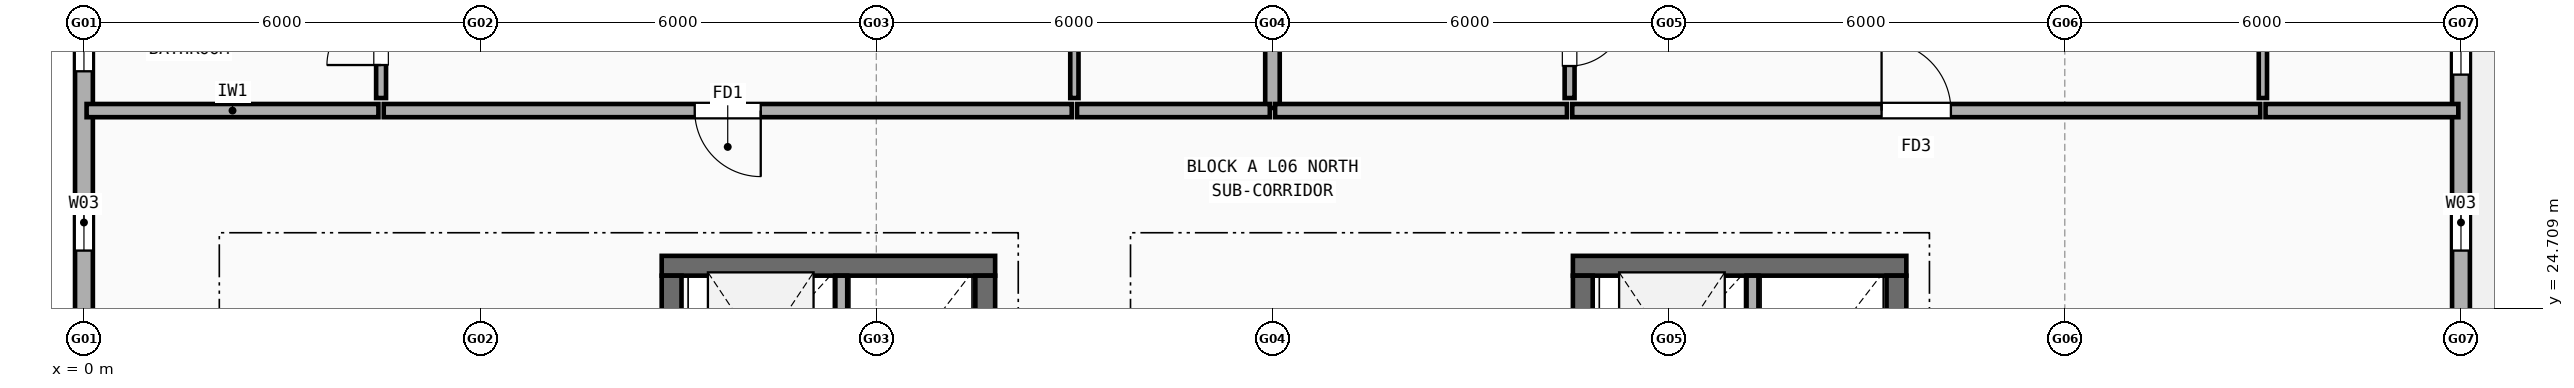
"""IFC4 building model, lengths in metres.
Left out: names, types, materials, properties, quantities, classifications, styles, units other than length and angle.
Written with IfcOpenShell. Run it as: python <this file> out.ifc"""

import sys

from ifc_helpers import new_model, si_unit, direction, frame, frame_2d, origin, place, context, subcontext, project, spatial, rectangle, extrude, element, fill, save


model = new_model("IFC4")
c1 = context("Model", 3, precision=1e-05, world=origin(), true_north=direction((0.0, 1.0)))
c2 = subcontext(c1, "Body", "Model", "MODEL_VIEW")
j1 = project(units=[si_unit("LENGTHUNIT", "METRE"), si_unit("PLANEANGLEUNIT", "RADIAN")], contexts=[c1])
p1 = place(None, origin())
s1 = spatial("IfcSite", under=j1, at=p1, CompositionType="ELEMENT")
p2 = place(p1, origin())
s2 = spatial("IfcBuilding", under=s1, at=p2, CompositionType="ELEMENT")
p3 = place(p2, frame((0.0, 0.0, 20.5)))
s3 = spatial("IfcBuildingStorey", under=s2, at=p3, CompositionType="ELEMENT", Elevation=20.5)
p4 = place(p3, frame((36.0, 24.35, 0.0), z_axis=(0.0, 0.0, 1.0), x_axis=(0.0, 1.0, 0.0)))
e1 = element("IfcWall", 1, at=p4, inside=s3, PredefinedType="STANDARD", context=c2, shape_type="SweptSolid", body=[
    extrude(rectangle(XDim=5.3, YDim=0.27, at=frame_2d((2.65, 0.0))), origin(), (0.0, 0.0, 1.0), 2.452),
])
p5 = place(p4, frame((1.23, 0.0, 0.9)))
e2 = element("IfcOpeningElement", 2, at=p5, cuts=e1, PredefinedType="OPENING", context=c2, shape_type="SweptSolid", body=[
    extrude(rectangle(XDim=0.85, YDim=1.25, at=frame_2d((0.425, 0.625))), frame((0.0, 0.145, 0.0), z_axis=(0.0, -1.0, 0.0), x_axis=(1.0, 0.0, 0.0)), (0.0, 0.0, 1.0), 0.29),
])
p6 = place(p4, frame((3.895, 0.0, 0.9)))
e3 = element("IfcOpeningElement", 3, at=p6, cuts=e1, PredefinedType="OPENING", context=c2, shape_type="SweptSolid", body=[
    extrude(rectangle(XDim=0.9, YDim=1.3, at=frame_2d((0.45, 0.65))), frame((0.0, 0.145, 0.0), z_axis=(0.0, -1.0, 0.0), x_axis=(1.0, 0.0, 0.0)), (0.0, 0.0, 1.0), 0.29),
])
p7 = place(p3, frame((0.0, 29.65, 0.0), z_axis=(0.0, 0.0, 1.0), x_axis=(0.0, -1.0, 0.0)))
e4 = element("IfcWall", 4, at=p7, inside=s3, PredefinedType="STANDARD", context=c2, shape_type="SweptSolid", body=[
    extrude(rectangle(XDim=5.3, YDim=0.27, at=frame_2d((2.65, 0.0))), origin(), (0.0, 0.0, 1.0), 2.452),
])
p8 = place(p7, frame((0.555, 0.0, 0.9)))
e5 = element("IfcOpeningElement", 5, at=p8, cuts=e4, PredefinedType="OPENING", context=c2, shape_type="SweptSolid", body=[
    extrude(rectangle(XDim=0.8, YDim=1.2, at=frame_2d((0.4, 0.6))), frame((0.0, 0.145, 0.0), z_axis=(0.0, -1.0, 0.0), x_axis=(1.0, 0.0, 0.0)), (0.0, 0.0, 1.0), 0.29),
])
p9 = place(p7, frame((3.22, 0.0, 0.9)))
e6 = element("IfcOpeningElement", 6, at=p9, cuts=e4, PredefinedType="OPENING", context=c2, shape_type="SweptSolid", body=[
    extrude(rectangle(XDim=0.85, YDim=1.25, at=frame_2d((0.425, 0.625))), frame((0.0, 0.145, 0.0), z_axis=(0.0, -1.0, 0.0), x_axis=(1.0, 0.0, 0.0)), (0.0, 0.0, 1.0), 0.29),
])
p10 = place(p3, frame((13.8, 25.35, 0.0), z_axis=(0.0, 0.0, 1.0), x_axis=(-1.0, 0.0, 0.0)))
e7 = element("IfcWall", 7, at=p10, inside=s3, PredefinedType="SHEAR", context=c2, shape_type="SweptSolid", body=[
    extrude(rectangle(XDim=5.05, YDim=0.3, at=frame_2d((2.525, 0.0))), origin(), (0.0, 0.0, 1.0), 2.97),
])
p11 = place(p3, frame((13.65, 18.75, 0.0), z_axis=(0.0, 0.0, 1.0), x_axis=(0.0, 1.0, 0.0)))
e8 = element("IfcWall", 8, at=p11, inside=s3, PredefinedType="SHEAR", context=c2, shape_type="SweptSolid", body=[
    extrude(rectangle(XDim=6.45, YDim=0.3, at=frame_2d((3.225, 0.0))), origin(), (0.0, 0.0, 1.0), 2.97),
])
p12 = place(p3, frame((8.9, 21.75, 0.0), z_axis=(0.0, 0.0, 1.0), x_axis=(0.0, 1.0, 0.0)))
e9 = element("IfcWall", 9, at=p12, inside=s3, PredefinedType="SHEAR", context=c2, shape_type="SweptSolid", body=[
    extrude(rectangle(XDim=3.45, YDim=0.3, at=frame_2d((1.725, 0.0))), origin(), (0.0, 0.0, 1.0), 2.97),
])
p13 = place(p3, frame((11.47, 22.94, 0.0), z_axis=(0.0, 0.0, 1.0), x_axis=(0.0, 1.0, 0.0)))
e10 = element("IfcWall", 10, at=p13, inside=s3, PredefinedType="SOLIDWALL", context=c2, shape_type="SweptSolid", body=[
    extrude(rectangle(XDim=2.26, YDim=0.18, at=frame_2d((1.13, 0.0))), origin(), (0.0, 0.0, 1.0), 2.97),
])
p14 = place(p3, frame((27.6, 25.35, 0.0), z_axis=(0.0, 0.0, 1.0), x_axis=(-1.0, 0.0, 0.0)))
e11 = element("IfcWall", 11, at=p14, inside=s3, PredefinedType="SHEAR", context=c2, shape_type="SweptSolid", body=[
    extrude(rectangle(XDim=5.05, YDim=0.3, at=frame_2d((2.525, 0.0))), origin(), (0.0, 0.0, 1.0), 2.97),
])
p15 = place(p3, frame((27.45, 18.75, 0.0), z_axis=(0.0, 0.0, 1.0), x_axis=(0.0, 1.0, 0.0)))
e12 = element("IfcWall", 12, at=p15, inside=s3, PredefinedType="SHEAR", context=c2, shape_type="SweptSolid", body=[
    extrude(rectangle(XDim=6.45, YDim=0.3, at=frame_2d((3.225, 0.0))), origin(), (0.0, 0.0, 1.0), 2.97),
])
p16 = place(p3, frame((22.7, 21.75, 0.0), z_axis=(0.0, 0.0, 1.0), x_axis=(0.0, 1.0, 0.0)))
e13 = element("IfcWall", 13, at=p16, inside=s3, PredefinedType="SHEAR", context=c2, shape_type="SweptSolid", body=[
    extrude(rectangle(XDim=3.45, YDim=0.3, at=frame_2d((1.725, 0.0))), origin(), (0.0, 0.0, 1.0), 2.97),
])
p17 = place(p3, frame((25.27, 22.94, 0.0), z_axis=(0.0, 0.0, 1.0), x_axis=(0.0, 1.0, 0.0)))
e14 = element("IfcWall", 14, at=p17, inside=s3, PredefinedType="SOLIDWALL", context=c2, shape_type="SweptSolid", body=[
    extrude(rectangle(XDim=2.26, YDim=0.18, at=frame_2d((1.13, 0.0))), origin(), (0.0, 0.0, 1.0), 2.97),
])
p18 = place(p3, frame((18.0, 27.74, 0.0), z_axis=(0.0, 0.0, 1.0), x_axis=(0.0, 1.0, 0.0)))
e15 = element("IfcWall", 15, at=p18, inside=s3, PredefinedType="SOLIDWALL", context=c2, shape_type="SweptSolid", body=[
    extrude(rectangle(XDim=7.87, YDim=0.22, at=frame_2d((3.935, 0.0))), origin(), (0.0, 0.0, 1.0), 2.458),
])
p19 = place(p3, frame((0.04, 27.7, 0.0), z_axis=(0.0, 0.0, 1.0), x_axis=(1.0, 0.0, 0.0)))
e16 = element("IfcWall", 16, at=p19, inside=s3, PredefinedType="SOLIDWALL", context=c2, shape_type="SweptSolid", body=[
    extrude(rectangle(XDim=4.42, YDim=0.2, at=frame_2d((2.21, 0.0))), origin(), (0.0, 0.0, 1.0), 2.452),
])
p20 = place(p3, frame((4.54, 27.7, 0.0), z_axis=(0.0, 0.0, 1.0), x_axis=(1.0, 0.0, 0.0)))
e17 = element("IfcWall", 17, at=p20, inside=s3, PredefinedType="SOLIDWALL", context=c2, shape_type="SweptSolid", body=[
    extrude(rectangle(XDim=10.42, YDim=0.2, at=frame_2d((5.21, 0.0))), origin(), (0.0, 0.0, 1.0), 2.508),
])
p21 = place(p20, frame((4.71, 0.0, 0.0)))
e18 = element("IfcOpeningElement", 18, at=p21, cuts=e17, PredefinedType="OPENING", context=c2, shape_type="SweptSolid", body=[
    extrude(rectangle(XDim=1.0, YDim=2.15, at=frame_2d((0.5, 1.075))), frame((0.0, 0.11, 0.0), z_axis=(0.0, -1.0, 0.0), x_axis=(1.0, 0.0, 0.0)), (0.0, 0.0, 1.0), 0.22),
])
p22 = place(p3, frame((4.5, 27.89, 0.0), z_axis=(0.0, 0.0, 1.0), x_axis=(0.0, 1.0, 0.0)))
e19 = element("IfcWall", 19, at=p22, inside=s3, PredefinedType="PARTITIONING", context=c2, shape_type="SweptSolid", body=[
    extrude(rectangle(XDim=1.82, YDim=0.15, at=frame_2d((0.91, 0.0))), origin(), (0.0, 0.0, 1.0), 2.97),
])
p23 = place(p22, frame((0.5, 0.0, 0.0)))
e20 = element("IfcOpeningElement", 20, at=p23, cuts=e19, PredefinedType="OPENING", context=c2, shape_type="SweptSolid", body=[
    extrude(rectangle(XDim=0.82, YDim=2.08, at=frame_2d((0.41, 1.04))), frame((0.0, 0.085, 0.0), z_axis=(0.0, -1.0, 0.0), x_axis=(1.0, 0.0, 0.0)), (0.0, 0.0, 1.0), 0.17),
])
p24 = place(p3, frame((15.04, 27.7, 0.0), z_axis=(0.0, 0.0, 1.0), x_axis=(1.0, 0.0, 0.0)))
e21 = element("IfcWall", 21, at=p24, inside=s3, PredefinedType="SOLIDWALL", context=c2, shape_type="SweptSolid", body=[
    extrude(rectangle(XDim=2.92, YDim=0.2, at=frame_2d((1.46, 0.0))), origin(), (0.0, 0.0, 1.0), 2.97),
])
p25 = place(p3, frame((15.0, 27.89, 0.0), z_axis=(0.0, 0.0, 1.0), x_axis=(0.0, 1.0, 0.0)))
e22 = element("IfcWall", 22, at=p25, inside=s3, PredefinedType="PARTITIONING", context=c2, shape_type="SweptSolid", body=[
    extrude(rectangle(XDim=7.92, YDim=0.125, at=frame_2d((3.96, 0.0))), origin(), (0.0, 0.0, 1.0), 2.452),
])
p26 = place(p25, frame((3.65, 0.0, 0.0)))
e23 = element("IfcOpeningElement", 23, at=p26, cuts=e22, PredefinedType="OPENING", context=c2, shape_type="SweptSolid", body=[
    extrude(rectangle(XDim=0.9, YDim=2.1, at=frame_2d((0.45, 1.05))), frame((0.0, 0.073, 0.0), z_axis=(0.0, -1.0, 0.0), x_axis=(1.0, 0.0, 0.0)), (0.0, 0.0, 1.0), 0.145),
])
p27 = place(p3, frame((18.04, 27.7, 0.0), z_axis=(0.0, 0.0, 1.0), x_axis=(1.0, 0.0, 0.0)))
e24 = element("IfcWall", 24, at=p27, inside=s3, PredefinedType="SOLIDWALL", context=c2, shape_type="SweptSolid", body=[
    extrude(rectangle(XDim=4.42, YDim=0.2, at=frame_2d((2.21, 0.0))), origin(), (0.0, 0.0, 1.0), 2.97),
])
p28 = place(p3, frame((22.54, 27.7, 0.0), z_axis=(0.0, 0.0, 1.0), x_axis=(1.0, 0.0, 0.0)))
e25 = element("IfcWall", 25, at=p28, inside=s3, PredefinedType="SOLIDWALL", context=c2, shape_type="SweptSolid", body=[
    extrude(rectangle(XDim=10.42, YDim=0.2, at=frame_2d((5.21, 0.0))), origin(), (0.0, 0.0, 1.0), 2.452),
])
p29 = place(p28, frame((4.685, 0.0, 0.0)))
e26 = element("IfcOpeningElement", 26, at=p29, cuts=e25, PredefinedType="OPENING", context=c2, shape_type="SweptSolid", body=[
    extrude(rectangle(XDim=1.05, YDim=2.15, at=frame_2d((0.525, 1.075))), frame((0.0, 0.11, 0.0), z_axis=(0.0, -1.0, 0.0), x_axis=(1.0, 0.0, 0.0)), (0.0, 0.0, 1.0), 0.22),
])
p30 = place(p3, frame((22.5, 27.89, 0.0), z_axis=(0.0, 0.0, 1.0), x_axis=(0.0, 1.0, 0.0)))
e27 = element("IfcWall", 27, at=p30, inside=s3, PredefinedType="PARTITIONING", context=c2, shape_type="SweptSolid", body=[
    extrude(rectangle(XDim=1.82, YDim=0.15, at=frame_2d((0.91, 0.0))), origin(), (0.0, 0.0, 1.0), 2.97),
])
p31 = place(p30, frame((0.485, 0.0, 0.0)))
e28 = element("IfcOpeningElement", 28, at=p31, cuts=e27, PredefinedType="OPENING", context=c2, shape_type="SweptSolid", body=[
    extrude(rectangle(XDim=0.85, YDim=2.1, at=frame_2d((0.425, 1.05))), frame((0.0, 0.085, 0.0), z_axis=(0.0, -1.0, 0.0), x_axis=(1.0, 0.0, 0.0)), (0.0, 0.0, 1.0), 0.17),
])
p32 = place(p3, frame((33.04, 27.7, 0.0), z_axis=(0.0, 0.0, 1.0), x_axis=(1.0, 0.0, 0.0)))
e29 = element("IfcWall", 29, at=p32, inside=s3, PredefinedType="SOLIDWALL", context=c2, shape_type="SweptSolid", body=[
    extrude(rectangle(XDim=2.92, YDim=0.2, at=frame_2d((1.46, 0.0))), origin(), (0.0, 0.0, 1.0), 2.452),
])
p33 = place(p3, frame((33.0, 27.89, 0.0), z_axis=(0.0, 0.0, 1.0), x_axis=(0.0, 1.0, 0.0)))
e30 = element("IfcWall", 30, at=p33, inside=s3, PredefinedType="PARTITIONING", context=c2, shape_type="SweptSolid", body=[
    extrude(rectangle(XDim=7.92, YDim=0.125, at=frame_2d((3.96, 0.0))), origin(), (0.0, 0.0, 1.0), 2.452),
])
p34 = place(p33, frame((3.65, 0.0, 0.0)))
e31 = element("IfcOpeningElement", 31, at=p34, cuts=e30, PredefinedType="OPENING", context=c2, shape_type="SweptSolid", body=[
    extrude(rectangle(XDim=0.88, YDim=2.1, at=frame_2d((0.44, 1.05))), frame((0.0, 0.073, 0.0), z_axis=(0.0, -1.0, 0.0), x_axis=(1.0, 0.0, 0.0)), (0.0, 0.0, 1.0), 0.145),
])
p35 = place(p5, origin())
e32 = element("IfcWindow", 32, at=p35, inside=s3, PartitioningType="SINGLE_PANEL", PredefinedType="WINDOW", context=c2, shape_type="SweptSolid", body=[
    extrude(rectangle(XDim=0.85, YDim=1.25, at=frame_2d((0.425, 0.625))), frame((0.0, 0.03, 0.0), z_axis=(0.0, -1.0, 0.0), x_axis=(1.0, 0.0, 0.0)), (0.0, 0.0, 1.0), 0.06),
])
fill(e2, e32)
p36 = place(p6, origin())
e33 = element("IfcWindow", 33, at=p36, inside=s3, PartitioningType="SINGLE_PANEL", PredefinedType="WINDOW", context=c2, shape_type="SweptSolid", body=[
    extrude(rectangle(XDim=0.9, YDim=1.3, at=frame_2d((0.45, 0.65))), frame((0.0, 0.03, 0.0), z_axis=(0.0, -1.0, 0.0), x_axis=(1.0, 0.0, 0.0)), (0.0, 0.0, 1.0), 0.06),
])
fill(e3, e33)
p37 = place(p8, origin())
e34 = element("IfcWindow", 34, at=p37, inside=s3, PartitioningType="SINGLE_PANEL", PredefinedType="WINDOW", context=c2, shape_type="SweptSolid", body=[
    extrude(rectangle(XDim=0.8, YDim=1.2, at=frame_2d((0.4, 0.6))), frame((0.0, 0.03, 0.0), z_axis=(0.0, -1.0, 0.0), x_axis=(1.0, 0.0, 0.0)), (0.0, 0.0, 1.0), 0.06),
])
fill(e5, e34)
p38 = place(p9, origin())
e35 = element("IfcWindow", 35, at=p38, inside=s3, PartitioningType="SINGLE_PANEL", PredefinedType="WINDOW", context=c2, shape_type="SweptSolid", body=[
    extrude(rectangle(XDim=0.85, YDim=1.25, at=frame_2d((0.425, 0.625))), frame((0.0, 0.03, 0.0), z_axis=(0.0, -1.0, 0.0), x_axis=(1.0, 0.0, 0.0)), (0.0, 0.0, 1.0), 0.06),
])
fill(e6, e35)
p39 = place(p21, origin())
e36 = element("IfcDoor", 36, at=p39, inside=s3, OperationType="SINGLE_SWING_RIGHT", PredefinedType="DOOR", context=c2, shape_type="SweptSolid", body=[
    extrude(rectangle(XDim=1.0, YDim=2.15, at=frame_2d((0.5, 1.075))), frame((0.0, 0.025, 0.0), z_axis=(0.0, -1.0, 0.0), x_axis=(1.0, 0.0, 0.0)), (0.0, 0.0, 1.0), 0.05),
])
fill(e18, e36)
p40 = place(p23, origin())
e37 = element("IfcDoor", 37, at=p40, inside=s3, OperationType="SINGLE_SWING_LEFT", PredefinedType="DOOR", context=c2, shape_type="SweptSolid", body=[
    extrude(rectangle(XDim=0.82, YDim=2.08, at=frame_2d((0.41, 1.04))), frame((0.0, 0.025, 0.0), z_axis=(0.0, -1.0, 0.0), x_axis=(1.0, 0.0, 0.0)), (0.0, 0.0, 1.0), 0.05),
])
fill(e20, e37)
p41 = place(p29, origin())
e38 = element("IfcDoor", 38, at=p41, inside=s3, OperationType="SINGLE_SWING_LEFT", PredefinedType="DOOR", context=c2, shape_type="SweptSolid", body=[
    extrude(rectangle(XDim=1.05, YDim=2.15, at=frame_2d((0.525, 1.075))), frame((0.0, 0.025, 0.0), z_axis=(0.0, -1.0, 0.0), x_axis=(1.0, 0.0, 0.0)), (0.0, 0.0, 1.0), 0.05),
])
fill(e26, e38)
p42 = place(p31, origin())
e39 = element("IfcDoor", 39, at=p42, inside=s3, OperationType="SINGLE_SWING_RIGHT", PredefinedType="DOOR", context=c2, shape_type="SweptSolid", body=[
    extrude(rectangle(XDim=0.85, YDim=2.1, at=frame_2d((0.425, 1.05))), frame((0.0, 0.025, 0.0), z_axis=(0.0, -1.0, 0.0), x_axis=(1.0, 0.0, 0.0)), (0.0, 0.0, 1.0), 0.05),
])
fill(e28, e39)
save(model, sys.argv[1])
